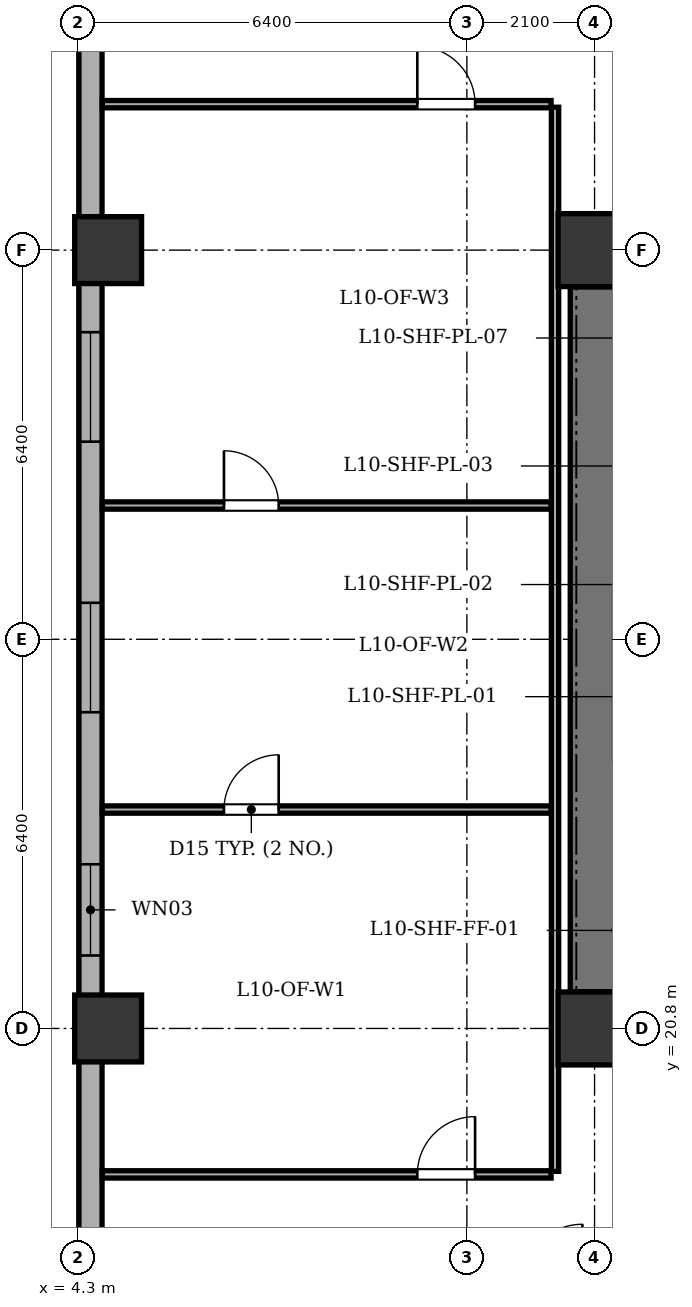
"""IFC4 building model, lengths in metres.
Left out: names, types, materials, properties, quantities, classifications, styles, units other than length and angle.
Written with IfcOpenShell. Run it as: python <this file> out.ifc"""

import sys

from ifc_helpers import new_model, si_unit, direction, frame, frame_2d, origin, origin_2d, place, context, subcontext, project, spatial, rectangle, extrude, element, fill, save


model = new_model("IFC4")
c1 = context("Model", 3, precision=1e-05, world=origin(), true_north=direction((0.0, 1.0)))
c2 = subcontext(c1, "Body", "Model", "MODEL_VIEW")
j1 = project(units=[si_unit("LENGTHUNIT", "METRE"), si_unit("PLANEANGLEUNIT", "RADIAN")], contexts=[c1])
p1 = place(None, origin())
s1 = spatial("IfcSite", under=j1, at=p1, CompositionType="ELEMENT")
p2 = place(p1, origin())
s2 = spatial("IfcBuilding", under=s1, at=p2, CompositionType="ELEMENT")
p3 = place(p2, frame((0.0, 0.0, 43.8)))
s3 = spatial("IfcBuildingStorey", under=s2, at=p3, CompositionType="ELEMENT", Elevation=43.8)
for number, where, z_axis, x_axis in (
    (1, (12.8, 20.8, 0.0), (0.0, 0.0, 1.0), (1.0, 0.0, 0.0)),
    (2, (12.8, 33.6, 0.0), (0.0, 0.0, 1.0), (1.0, 0.0, 0.0)),
):
    element("IfcColumn", number, at=place(p3, frame(where, z_axis=z_axis, x_axis=x_axis)), inside=s3, PredefinedType="COLUMN", context=c2, shape_type="SweptSolid", body=[
        extrude(rectangle(XDim=1.2, YDim=1.2, at=origin_2d()), origin(), (0.0, 0.0, 1.0), 3.9),
    ])
for number, where, z_axis, x_axis in (
    (3, (4.8, 20.8, 0.0), (0.0, 0.0, 1.0), (1.0, 0.0, 0.0)),
    (4, (4.8, 33.6, 0.0), (0.0, 0.0, 1.0), (1.0, 0.0, 0.0)),
):
    element("IfcColumn", number, at=place(p3, frame(where, z_axis=z_axis, x_axis=x_axis)), inside=s3, PredefinedType="COLUMN", context=c2, shape_type="SweptSolid", body=[
        extrude(rectangle(XDim=1.1, YDim=1.1, at=origin_2d()), origin(), (0.0, 0.0, 1.0), 3.9),
    ])
p4 = place(p3, frame((4.51, 6.5, 0.0), z_axis=(0.0, 0.0, 1.0), x_axis=(0.0, 1.0, 0.0)))
e5 = element("IfcWall", 5, at=p4, inside=s3, PredefinedType="STANDARD", context=c2, shape_type="SweptSolid", body=[
    extrude(rectangle(XDim=35.0, YDim=0.38, at=frame_2d((17.5, 0.0))), origin(), (0.0, 0.0, 1.0), 2.835),
])
p5 = place(p4, frame((2.693, 0.0, 0.8)))
e6 = element("IfcOpeningElement", 6, at=p5, cuts=e5, PredefinedType="OPENING", context=c2, shape_type="SweptSolid", body=[
    extrude(rectangle(XDim=1.8, YDim=1.9, at=frame_2d((0.9, 0.95))), frame((0.0, 0.2, 0.0), z_axis=(0.0, -1.0, 0.0), x_axis=(1.0, 0.0, 0.0)), (0.0, 0.0, 1.0), 0.4),
])
p6 = place(p4, frame((7.457, 0.0, 0.8)))
e7 = element("IfcOpeningElement", 7, at=p6, cuts=e5, PredefinedType="OPENING", context=c2, shape_type="SweptSolid", body=[
    extrude(rectangle(XDim=2.4, YDim=1.9, at=frame_2d((1.2, 0.95))), frame((0.0, 0.2, 0.0), z_axis=(0.0, -1.0, 0.0), x_axis=(1.0, 0.0, 0.0)), (0.0, 0.0, 1.0), 0.4),
])
p7 = place(p4, frame((15.5, 0.0, 0.8)))
e8 = element("IfcOpeningElement", 8, at=p7, cuts=e5, PredefinedType="OPENING", context=c2, shape_type="SweptSolid", body=[
    extrude(rectangle(XDim=1.5, YDim=1.9, at=frame_2d((0.75, 0.95))), frame((0.0, 0.2, 0.0), z_axis=(0.0, -1.0, 0.0), x_axis=(1.0, 0.0, 0.0)), (0.0, 0.0, 1.0), 0.4),
])
p8 = place(p4, frame((19.5, 0.0, 0.8)))
e9 = element("IfcOpeningElement", 9, at=p8, cuts=e5, PredefinedType="OPENING", context=c2, shape_type="SweptSolid", body=[
    extrude(rectangle(XDim=1.8, YDim=1.9, at=frame_2d((0.9, 0.95))), frame((0.0, 0.2, 0.0), z_axis=(0.0, -1.0, 0.0), x_axis=(1.0, 0.0, 0.0)), (0.0, 0.0, 1.0), 0.4),
])
p9 = place(p4, frame((23.95, 0.0, 0.8)))
e10 = element("IfcOpeningElement", 10, at=p9, cuts=e5, PredefinedType="OPENING", context=c2, shape_type="SweptSolid", body=[
    extrude(rectangle(XDim=1.8, YDim=1.9, at=frame_2d((0.9, 0.95))), frame((0.0, 0.2, 0.0), z_axis=(0.0, -1.0, 0.0), x_axis=(1.0, 0.0, 0.0)), (0.0, 0.0, 1.0), 0.4),
])
p10 = place(p4, frame((31.175, 0.0, 0.8)))
e11 = element("IfcOpeningElement", 11, at=p10, cuts=e5, PredefinedType="OPENING", context=c2, shape_type="SweptSolid", body=[
    extrude(rectangle(XDim=1.8, YDim=1.9, at=frame_2d((0.9, 0.95))), frame((0.0, 0.2, 0.0), z_axis=(0.0, -1.0, 0.0), x_axis=(1.0, 0.0, 0.0)), (0.0, 0.0, 1.0), 0.4),
])
p11 = place(p3, frame((12.8, 21.405, 0.0), z_axis=(0.0, 0.0, 1.0), x_axis=(0.0, 1.0, 0.0)))
e12 = element("IfcWall", 12, at=p11, inside=s3, PredefinedType="SHEAR", context=c2, shape_type="SweptSolid", body=[
    extrude(rectangle(XDim=11.59, YDim=0.8, at=frame_2d((5.795, 0.0))), origin(), (0.0, 0.0, 1.0), 3.45),
])
p12 = place(p3, frame((12.15, 18.45, 0.0), z_axis=(0.0, 0.0, 1.0), x_axis=(0.0, 1.0, 0.0)))
e13 = element("IfcWall", 13, at=p12, inside=s3, PredefinedType="PARTITIONING", context=c2, shape_type="SweptSolid", body=[
    extrude(rectangle(XDim=17.5, YDim=0.12, at=frame_2d((8.75, 0.0))), origin(), (0.0, 0.0, 1.0), 3.45),
])
p13 = place(p3, frame((4.705, 18.4, 0.0), z_axis=(0.0, 0.0, 1.0), x_axis=(1.0, 0.0, 0.0)))
e14 = element("IfcWall", 14, at=p13, inside=s3, PredefinedType="PARTITIONING", context=c2, shape_type="SweptSolid", body=[
    extrude(rectangle(XDim=7.38, YDim=0.12, at=frame_2d((3.69, 0.0))), origin(), (0.0, 0.0, 1.0), 3.45),
])
p14 = place(p13, frame((5.18, 0.0, 0.0)))
e15 = element("IfcOpeningElement", 15, at=p14, cuts=e14, PredefinedType="OPENING", context=c2, shape_type="SweptSolid", body=[
    extrude(rectangle(XDim=0.95, YDim=2.1, at=frame_2d((0.475, 1.05))), frame((0.0, 0.07, 0.0), z_axis=(0.0, -1.0, 0.0), x_axis=(1.0, 0.0, 0.0)), (0.0, 0.0, 1.0), 0.14),
])
p15 = place(p3, frame((4.705, 36.0, 0.0), z_axis=(0.0, 0.0, 1.0), x_axis=(1.0, 0.0, 0.0)))
e16 = element("IfcWall", 16, at=p15, inside=s3, PredefinedType="PARTITIONING", context=c2, shape_type="SweptSolid", body=[
    extrude(rectangle(XDim=7.38, YDim=0.12, at=frame_2d((3.69, 0.0))), origin(), (0.0, 0.0, 1.0), 3.45),
])
p16 = place(p15, frame((5.18, 0.0, 0.0)))
e17 = element("IfcOpeningElement", 17, at=p16, cuts=e16, PredefinedType="OPENING", context=c2, shape_type="SweptSolid", body=[
    extrude(rectangle(XDim=0.95, YDim=2.1, at=frame_2d((0.475, 1.05))), frame((0.0, 0.07, 0.0), z_axis=(0.0, -1.0, 0.0), x_axis=(1.0, 0.0, 0.0)), (0.0, 0.0, 1.0), 0.14),
])
p17 = place(p3, frame((4.705, 24.4, 0.0), z_axis=(0.0, 0.0, 1.0), x_axis=(1.0, 0.0, 0.0)))
e18 = element("IfcWall", 18, at=p17, inside=s3, PredefinedType="PARTITIONING", context=c2, shape_type="SweptSolid", body=[
    extrude(rectangle(XDim=7.38, YDim=0.12, at=frame_2d((3.69, 0.0))), origin(), (0.0, 0.0, 1.0), 3.45),
])
p18 = place(p17, frame((2.0, 0.0, 0.0)))
e19 = element("IfcOpeningElement", 19, at=p18, cuts=e18, PredefinedType="OPENING", context=c2, shape_type="SweptSolid", body=[
    extrude(rectangle(XDim=0.9, YDim=2.05, at=frame_2d((0.45, 1.025))), frame((0.0, 0.07, 0.0), z_axis=(0.0, -1.0, 0.0), x_axis=(1.0, 0.0, 0.0)), (0.0, 0.0, 1.0), 0.14),
])
p19 = place(p3, frame((4.705, 29.4, 0.0), z_axis=(0.0, 0.0, 1.0), x_axis=(1.0, 0.0, 0.0)))
e20 = element("IfcWall", 20, at=p19, inside=s3, PredefinedType="PARTITIONING", context=c2, shape_type="SweptSolid", body=[
    extrude(rectangle(XDim=7.38, YDim=0.12, at=frame_2d((3.69, 0.0))), origin(), (0.0, 0.0, 1.0), 2.885),
])
p20 = place(p19, frame((2.0, 0.0, 0.0)))
e21 = element("IfcOpeningElement", 21, at=p20, cuts=e20, PredefinedType="OPENING", context=c2, shape_type="SweptSolid", body=[
    extrude(rectangle(XDim=0.9, YDim=2.05, at=frame_2d((0.45, 1.025))), frame((0.0, 0.07, 0.0), z_axis=(0.0, -1.0, 0.0), x_axis=(1.0, 0.0, 0.0)), (0.0, 0.0, 1.0), 0.14),
])
p21 = place(p7, origin())
e22 = element("IfcWindow", 22, at=p21, inside=s3, PartitioningType="SINGLE_PANEL", PredefinedType="WINDOW", context=c2, shape_type="SweptSolid", body=[
    extrude(rectangle(XDim=1.5, YDim=1.9, at=frame_2d((0.75, 0.95))), frame((0.0, -0.01, 0.0), z_axis=(0.0, -1.0, 0.0), x_axis=(1.0, 0.0, 0.0)), (0.0, 0.0, 1.0), 0.06),
])
fill(e8, e22)
p22 = place(p8, origin())
e23 = element("IfcWindow", 23, at=p22, inside=s3, PartitioningType="SINGLE_PANEL", PredefinedType="WINDOW", context=c2, shape_type="SweptSolid", body=[
    extrude(rectangle(XDim=1.8, YDim=1.9, at=frame_2d((0.9, 0.95))), frame((0.0, -0.01, 0.0), z_axis=(0.0, -1.0, 0.0), x_axis=(1.0, 0.0, 0.0)), (0.0, 0.0, 1.0), 0.06),
])
fill(e9, e23)
p23 = place(p9, origin())
e24 = element("IfcWindow", 24, at=p23, inside=s3, PartitioningType="SINGLE_PANEL", PredefinedType="WINDOW", context=c2, shape_type="SweptSolid", body=[
    extrude(rectangle(XDim=1.8, YDim=1.9, at=frame_2d((0.9, 0.95))), frame((0.0, -0.01, 0.0), z_axis=(0.0, -1.0, 0.0), x_axis=(1.0, 0.0, 0.0)), (0.0, 0.0, 1.0), 0.06),
])
fill(e10, e24)
p24 = place(p18, origin())
e25 = element("IfcDoor", 25, at=p24, inside=s3, OperationType="SINGLE_SWING_RIGHT", PredefinedType="DOOR", context=c2, shape_type="SweptSolid", body=[
    extrude(rectangle(XDim=0.9, YDim=2.05, at=frame_2d((0.45, 1.025))), frame((0.0, 0.025, 0.0), z_axis=(0.0, -1.0, 0.0), x_axis=(1.0, 0.0, 0.0)), (0.0, 0.0, 1.0), 0.05),
])
fill(e19, e25)
p25 = place(p20, origin())
e26 = element("IfcDoor", 26, at=p25, inside=s3, OperationType="SINGLE_SWING_LEFT", PredefinedType="DOOR", context=c2, shape_type="SweptSolid", body=[
    extrude(rectangle(XDim=0.9, YDim=2.05, at=frame_2d((0.45, 1.025))), frame((0.0, 0.025, 0.0), z_axis=(0.0, -1.0, 0.0), x_axis=(1.0, 0.0, 0.0)), (0.0, 0.0, 1.0), 0.05),
])
fill(e21, e26)
p26 = place(p14, origin())
e27 = element("IfcDoor", 27, at=p26, inside=s3, OperationType="SINGLE_SWING_RIGHT", PredefinedType="DOOR", context=c2, shape_type="SweptSolid", body=[
    extrude(rectangle(XDim=0.95, YDim=2.1, at=frame_2d((0.475, 1.05))), frame((0.0, 0.025, 0.0), z_axis=(0.0, -1.0, 0.0), x_axis=(1.0, 0.0, 0.0)), (0.0, 0.0, 1.0), 0.05),
])
fill(e15, e27)
p27 = place(p16, origin())
e28 = element("IfcDoor", 28, at=p27, inside=s3, OperationType="SINGLE_SWING_LEFT", PredefinedType="DOOR", context=c2, shape_type="SweptSolid", body=[
    extrude(rectangle(XDim=0.95, YDim=2.1, at=frame_2d((0.475, 1.05))), frame((0.0, 0.025, 0.0), z_axis=(0.0, -1.0, 0.0), x_axis=(1.0, 0.0, 0.0)), (0.0, 0.0, 1.0), 0.05),
])
fill(e17, e28)
save(model, sys.argv[1])
